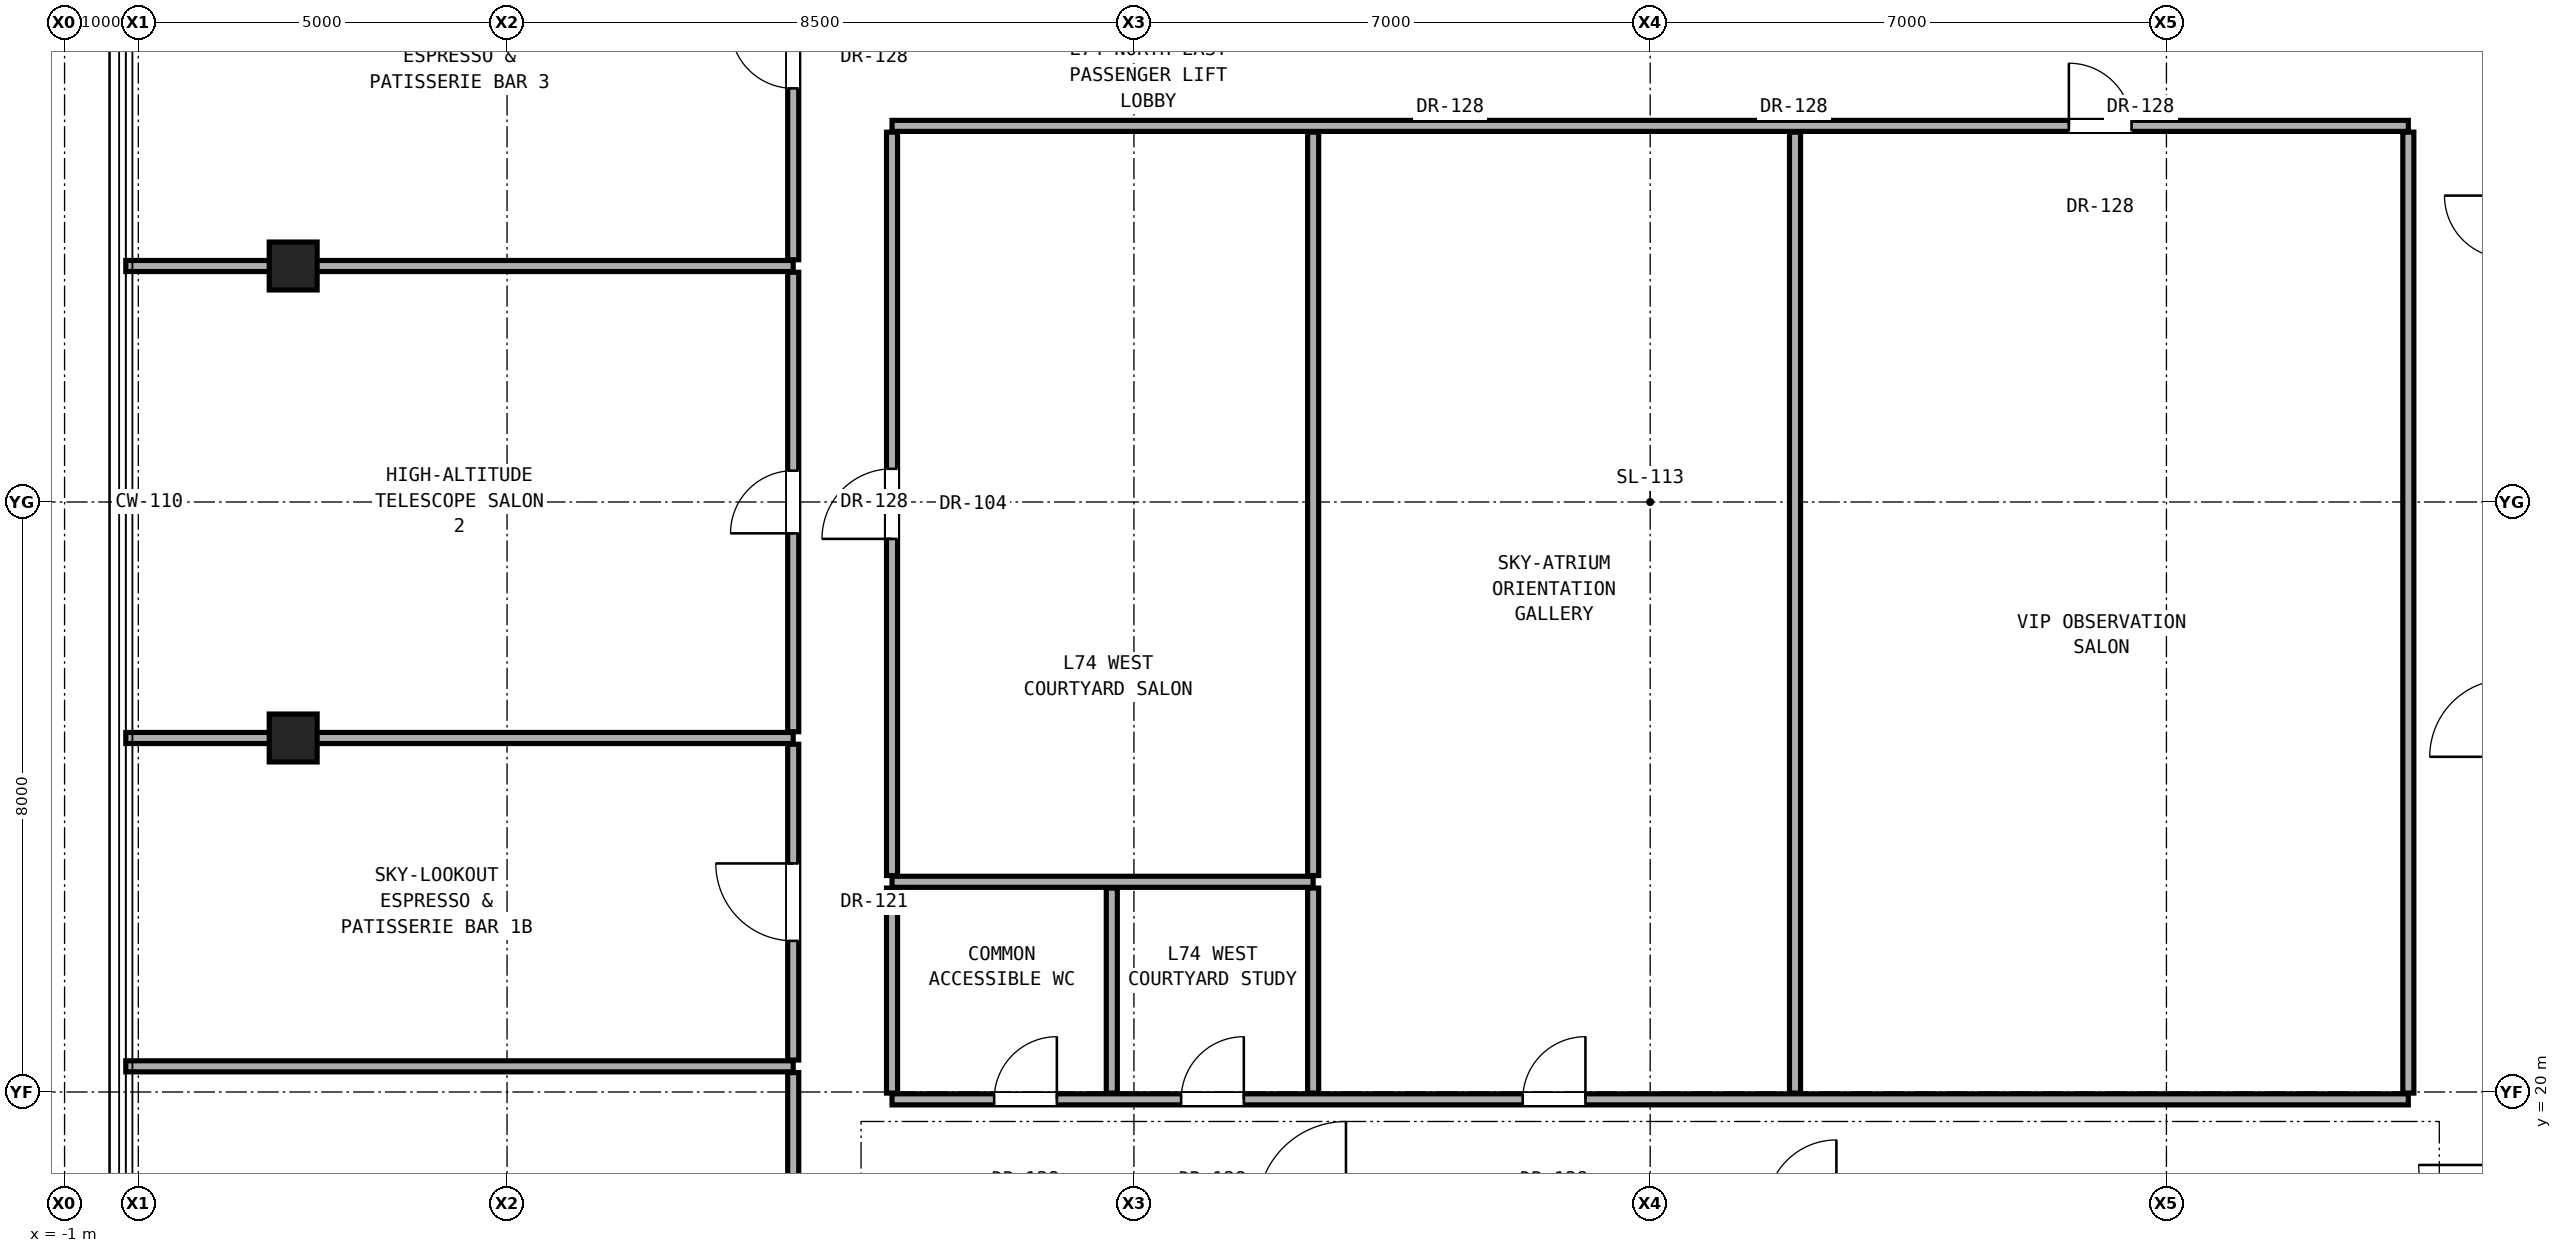
"""IFC4 building model, lengths in metres.
Left out: names, types, materials, properties, quantities, classifications, styles, units other than length and angle.
Written with IfcOpenShell. Run it as: python <this file> out.ifc"""

import sys

from ifc_helpers import new_model, si_unit, direction, frame, frame_2d, origin, origin_2d, place, context, subcontext, project, spatial, rectangle, hollow_rectangle, extrude, element, fill, save


model = new_model("IFC4")
c1 = context("Model", 3, precision=1e-05, world=origin(), true_north=direction((0.0, 1.0)))
c2 = subcontext(c1, "Body", "Model", "MODEL_VIEW")
j1 = project(units=[si_unit("LENGTHUNIT", "METRE"), si_unit("PLANEANGLEUNIT", "RADIAN")], contexts=[c1])
p1 = place(None, origin())
s1 = spatial("IfcSite", under=j1, at=p1, CompositionType="ELEMENT")
p2 = place(p1, origin())
s2 = spatial("IfcBuilding", under=s1, at=p2, CompositionType="ELEMENT")
p3 = place(p2, frame((0.0, 0.0, 259.9)))
s3 = spatial("IfcBuildingStorey", under=s2, at=p3, CompositionType="ELEMENT", Elevation=259.9)
for number, where, z_axis, x_axis in (
    (1, (2.1, 24.8, 0.0), (0.0, 0.0, 1.0), (1.0, 0.0, 0.0)),
    (2, (2.1, 31.2, 0.0), (0.0, 0.0, 1.0), (1.0, 0.0, 0.0)),
):
    element("IfcColumn", number, at=place(p3, frame(where, z_axis=z_axis, x_axis=x_axis)), inside=s3, PredefinedType="COLUMN", context=c2, shape_type="SweptSolid", body=[
        extrude(hollow_rectangle(XDim=0.65, YDim=0.65, WallThickness=0.036, at=origin_2d()), origin(), (0.0, 0.0, 1.0), 3.6),
    ])
p4 = place(p3, frame((10.22, 19.9, 0.0), z_axis=(0.0, 0.0, 1.0), x_axis=(1.0, 0.0, 0.0)))
e3 = element("IfcWall", 3, at=p4, inside=s3, PredefinedType="PARTITIONING", context=c2, shape_type="SweptSolid", body=[
    extrude(rectangle(XDim=20.56, YDim=0.15, at=frame_2d((10.28, 0.0))), origin(), (0.0, 0.0, 1.0), 2.086),
])
p5 = place(p4, frame((1.385, 0.0, 0.0)))
e4 = element("IfcOpeningElement", 4, at=p5, cuts=e3, PredefinedType="OPENING", context=c2, shape_type="SweptSolid", body=[
    extrude(rectangle(XDim=0.85, YDim=2.01, at=frame_2d((0.425, 1.005))), frame((0.0, 0.085, 0.0), z_axis=(0.0, -1.0, 0.0), x_axis=(1.0, 0.0, 0.0)), (0.0, 0.0, 1.0), 0.17),
])
p6 = place(p4, frame((3.92, 0.0, 0.0)))
e5 = element("IfcOpeningElement", 5, at=p6, cuts=e3, PredefinedType="OPENING", context=c2, shape_type="SweptSolid", body=[
    extrude(rectangle(XDim=0.85, YDim=2.01, at=frame_2d((0.425, 1.005))), frame((0.0, 0.085, 0.0), z_axis=(0.0, -1.0, 0.0), x_axis=(1.0, 0.0, 0.0)), (0.0, 0.0, 1.0), 0.17),
])
p7 = place(p4, frame((8.552, 0.0, 0.0)))
e6 = element("IfcOpeningElement", 6, at=p7, cuts=e3, PredefinedType="OPENING", context=c2, shape_type="SweptSolid", body=[
    extrude(rectangle(XDim=0.85, YDim=2.01, at=frame_2d((0.425, 1.005))), frame((0.0, 0.085, 0.0), z_axis=(0.0, -1.0, 0.0), x_axis=(1.0, 0.0, 0.0)), (0.0, 0.0, 1.0), 0.17),
])
p8 = place(p3, frame((-0.17, 20.348, 0.0), z_axis=(0.0, 0.0, 1.0), x_axis=(1.0, 0.0, 0.0)))
e7 = element("IfcWall", 7, at=p8, inside=s3, PredefinedType="PARTITIONING", context=c2, shape_type="SweptSolid", body=[
    extrude(rectangle(XDim=9.05, YDim=0.15, at=frame_2d((4.525, 0.0))), origin(), (0.0, 0.0, 1.0), 2.169),
])
p9 = place(p3, frame((10.22, 22.85, 0.0), z_axis=(0.0, 0.0, 1.0), x_axis=(1.0, 0.0, 0.0)))
e8 = element("IfcWall", 8, at=p9, inside=s3, PredefinedType="PARTITIONING", context=c2, shape_type="SweptSolid", body=[
    extrude(rectangle(XDim=5.71, YDim=0.15, at=frame_2d((2.855, 0.0))), origin(), (0.0, 0.0, 1.0), 2.086),
])
for number, where, z_axis, x_axis in (
    (9, (-0.17, 24.8, 0.0), (0.0, 0.0, 1.0), (1.0, 0.0, 0.0)),
    (10, (-0.17, 31.2, 0.0), (0.0, 0.0, 1.0), (1.0, 0.0, 0.0)),
):
    element("IfcWall", number, at=place(p3, frame(where, z_axis=z_axis, x_axis=x_axis)), inside=s3, PredefinedType="PARTITIONING", context=c2, shape_type="SweptSolid", body=[
        extrude(rectangle(XDim=9.05, YDim=0.15, at=frame_2d((4.525, 0.0))), origin(), (0.0, 0.0, 1.0), 2.169),
    ])
p10 = place(p3, frame((10.22, 33.1, 0.0), z_axis=(0.0, 0.0, 1.0), x_axis=(1.0, 0.0, 0.0)))
e11 = element("IfcWall", 11, at=p10, inside=s3, PredefinedType="PARTITIONING", context=c2, shape_type="SweptSolid", body=[
    extrude(rectangle(XDim=20.56, YDim=0.15, at=frame_2d((10.28, 0.0))), origin(), (0.0, 0.0, 1.0), 2.086),
])
p11 = place(p10, frame((15.957, 0.0, 0.0)))
e12 = element("IfcOpeningElement", 12, at=p11, cuts=e11, PredefinedType="OPENING", context=c2, shape_type="SweptSolid", body=[
    extrude(rectangle(XDim=0.85, YDim=2.01, at=frame_2d((0.425, 1.005))), frame((0.0, 0.085, 0.0), z_axis=(0.0, -1.0, 0.0), x_axis=(1.0, 0.0, 0.0)), (0.0, 0.0, 1.0), 0.17),
])
p12 = place(p3, frame((8.88, 14.766, 0.0), z_axis=(0.0, 0.0, 1.0), x_axis=(0.0, 1.0, 0.0)))
e13 = element("IfcWall", 13, at=p12, inside=s3, PredefinedType="PARTITIONING", context=c2, shape_type="SweptSolid", body=[
    extrude(rectangle(XDim=5.497, YDim=0.15, at=frame_2d((2.749, 0.0))), origin(), (0.0, 0.0, 1.0), 2.393),
])
p13 = place(p12, frame((2.148, 0.0, 0.0)))
e14 = element("IfcOpeningElement", 14, at=p13, cuts=e13, PredefinedType="OPENING", context=c2, shape_type="SweptSolid", body=[
    extrude(rectangle(XDim=1.2, YDim=2.25, at=frame_2d((0.6, 1.125))), frame((0.0, 0.085, 0.0), z_axis=(0.0, -1.0, 0.0), x_axis=(1.0, 0.0, 0.0)), (0.0, 0.0, 1.0), 0.17),
])
p14 = place(p3, frame((8.88, 20.433, 0.0), z_axis=(0.0, 0.0, 1.0), x_axis=(0.0, 1.0, 0.0)))
e15 = element("IfcWall", 15, at=p14, inside=s3, PredefinedType="PARTITIONING", context=c2, shape_type="SweptSolid", body=[
    extrude(rectangle(XDim=4.282, YDim=0.15, at=frame_2d((2.141, 0.0))), origin(), (0.0, 0.0, 1.0), 2.246),
])
p15 = place(p14, frame((1.616, 0.0, 0.0)))
e16 = element("IfcOpeningElement", 16, at=p15, cuts=e15, PredefinedType="OPENING", context=c2, shape_type="SweptSolid", body=[
    extrude(rectangle(XDim=1.05, YDim=2.2, at=frame_2d((0.525, 1.1))), frame((0.0, 0.085, 0.0), z_axis=(0.0, -1.0, 0.0), x_axis=(1.0, 0.0, 0.0)), (0.0, 0.0, 1.0), 0.17),
])
p16 = place(p3, frame((8.88, 24.885, 0.0), z_axis=(0.0, 0.0, 1.0), x_axis=(0.0, 1.0, 0.0)))
e17 = element("IfcWall", 17, at=p16, inside=s3, PredefinedType="PARTITIONING", context=c2, shape_type="SweptSolid", body=[
    extrude(rectangle(XDim=6.23, YDim=0.15, at=frame_2d((3.115, 0.0))), origin(), (0.0, 0.0, 1.0), 2.246),
])
p17 = place(p16, frame((2.69, 0.0, 0.0)))
e18 = element("IfcOpeningElement", 18, at=p17, cuts=e17, PredefinedType="OPENING", context=c2, shape_type="SweptSolid", body=[
    extrude(rectangle(XDim=0.85, YDim=2.01, at=frame_2d((0.425, 1.005))), frame((0.0, 0.085, 0.0), z_axis=(0.0, -1.0, 0.0), x_axis=(1.0, 0.0, 0.0)), (0.0, 0.0, 1.0), 0.17),
])
p18 = place(p3, frame((8.88, 31.285, 0.0), z_axis=(0.0, 0.0, 1.0), x_axis=(0.0, 1.0, 0.0)))
e19 = element("IfcWall", 19, at=p18, inside=s3, PredefinedType="PARTITIONING", context=c2, shape_type="SweptSolid", body=[
    extrude(rectangle(XDim=5.497, YDim=0.15, at=frame_2d((2.749, 0.0))), origin(), (0.0, 0.0, 1.0), 2.246),
])
p19 = place(p18, frame((2.323, 0.0, 0.0)))
e20 = element("IfcOpeningElement", 20, at=p19, cuts=e19, PredefinedType="OPENING", context=c2, shape_type="SweptSolid", body=[
    extrude(rectangle(XDim=0.85, YDim=2.01, at=frame_2d((0.425, 1.005))), frame((0.0, 0.085, 0.0), z_axis=(0.0, -1.0, 0.0), x_axis=(1.0, 0.0, 0.0)), (0.0, 0.0, 1.0), 0.17),
])
p20 = place(p3, frame((10.22, 19.985, 0.0), z_axis=(0.0, 0.0, 1.0), x_axis=(0.0, 1.0, 0.0)))
e21 = element("IfcWall", 21, at=p20, inside=s3, PredefinedType="PARTITIONING", context=c2, shape_type="SweptSolid", body=[
    extrude(rectangle(XDim=2.78, YDim=0.15, at=frame_2d((1.39, 0.0))), origin(), (0.0, 0.0, 1.0), 2.95),
])
p21 = place(p3, frame((10.22, 22.935, 0.0), z_axis=(0.0, 0.0, 1.0), x_axis=(0.0, 1.0, 0.0)))
e22 = element("IfcWall", 22, at=p21, inside=s3, PredefinedType="PARTITIONING", context=c2, shape_type="SweptSolid", body=[
    extrude(rectangle(XDim=10.08, YDim=0.15, at=frame_2d((5.04, 0.0))), origin(), (0.0, 0.0, 1.0), 2.246),
])
p22 = place(p21, frame((4.565, 0.0, 0.0)))
e23 = element("IfcOpeningElement", 23, at=p22, cuts=e22, PredefinedType="OPENING", context=c2, shape_type="SweptSolid", body=[
    extrude(rectangle(XDim=0.95, YDim=2.15, at=frame_2d((0.475, 1.075))), frame((0.0, 0.085, 0.0), z_axis=(0.0, -1.0, 0.0), x_axis=(1.0, 0.0, 0.0)), (0.0, 0.0, 1.0), 0.17),
])
for number, where, z_axis, x_axis in (
    (24, (13.2, 19.985, 0.0), (0.0, 0.0, 1.0), (0.0, 1.0, 0.0)),
    (25, (15.93, 19.985, 0.0), (0.0, 0.0, 1.0), (0.0, 1.0, 0.0)),
):
    element("IfcWall", number, at=place(p3, frame(where, z_axis=z_axis, x_axis=x_axis)), inside=s3, PredefinedType="PARTITIONING", context=c2, shape_type="SweptSolid", body=[
        extrude(rectangle(XDim=2.78, YDim=0.15, at=frame_2d((1.39, 0.0))), origin(), (0.0, 0.0, 1.0), 2.95),
    ])
p23 = place(p3, frame((15.93, 22.935, 0.0), z_axis=(0.0, 0.0, 1.0), x_axis=(0.0, 1.0, 0.0)))
e26 = element("IfcWall", 26, at=p23, inside=s3, PredefinedType="PARTITIONING", context=c2, shape_type="SweptSolid", body=[
    extrude(rectangle(XDim=10.08, YDim=0.15, at=frame_2d((5.04, 0.0))), origin(), (0.0, 0.0, 1.0), 2.086),
])
p24 = place(p3, frame((22.464, 19.985, 0.0), z_axis=(0.0, 0.0, 1.0), x_axis=(0.0, 1.0, 0.0)))
e27 = element("IfcWall", 27, at=p24, inside=s3, PredefinedType="PARTITIONING", context=c2, shape_type="SweptSolid", body=[
    extrude(rectangle(XDim=13.03, YDim=0.15, at=frame_2d((6.515, 0.0))), origin(), (0.0, 0.0, 1.0), 2.086),
])
p25 = place(p3, frame((30.78, 19.985, 0.0), z_axis=(0.0, 0.0, 1.0), x_axis=(0.0, 1.0, 0.0)))
e28 = element("IfcWall", 28, at=p25, inside=s3, PredefinedType="PARTITIONING", context=c2, shape_type="SweptSolid", body=[
    extrude(rectangle(XDim=13.03, YDim=0.15, at=frame_2d((6.515, 0.0))), origin(), (0.0, 0.0, 1.0), 2.246),
])
p26 = place(p5, origin())
e29 = element("IfcDoor", 29, at=p26, inside=s3, OperationType="SINGLE_SWING_RIGHT", PredefinedType="DOOR", context=c2, shape_type="SweptSolid", body=[
    extrude(rectangle(XDim=0.85, YDim=2.01, at=frame_2d((0.425, 1.005))), frame((0.0, 0.025, 0.0), z_axis=(0.0, -1.0, 0.0), x_axis=(1.0, 0.0, 0.0)), (0.0, 0.0, 1.0), 0.05),
])
fill(e4, e29)
p27 = place(p15, origin())
e30 = element("IfcDoor", 30, at=p27, inside=s3, OperationType="SINGLE_SWING_RIGHT", PredefinedType="DOOR", context=c2, shape_type="SweptSolid", body=[
    extrude(rectangle(XDim=1.05, YDim=2.2, at=frame_2d((0.525, 1.1))), frame((0.0, 0.025, 0.0), z_axis=(0.0, -1.0, 0.0), x_axis=(1.0, 0.0, 0.0)), (0.0, 0.0, 1.0), 0.05),
])
fill(e16, e30)
p28 = place(p17, origin())
e31 = element("IfcDoor", 31, at=p28, inside=s3, OperationType="SINGLE_SWING_LEFT", PredefinedType="DOOR", context=c2, shape_type="SweptSolid", body=[
    extrude(rectangle(XDim=0.85, YDim=2.01, at=frame_2d((0.425, 1.005))), frame((0.0, 0.025, 0.0), z_axis=(0.0, -1.0, 0.0), x_axis=(1.0, 0.0, 0.0)), (0.0, 0.0, 1.0), 0.05),
])
fill(e18, e31)
p29 = place(p19, origin())
e32 = element("IfcDoor", 32, at=p29, inside=s3, OperationType="SINGLE_SWING_RIGHT", PredefinedType="DOOR", context=c2, shape_type="SweptSolid", body=[
    extrude(rectangle(XDim=0.85, YDim=2.01, at=frame_2d((0.425, 1.005))), frame((0.0, 0.025, 0.0), z_axis=(0.0, -1.0, 0.0), x_axis=(1.0, 0.0, 0.0)), (0.0, 0.0, 1.0), 0.05),
])
fill(e20, e32)
p30 = place(p6, origin())
e33 = element("IfcDoor", 33, at=p30, inside=s3, OperationType="SINGLE_SWING_RIGHT", PredefinedType="DOOR", context=c2, shape_type="SweptSolid", body=[
    extrude(rectangle(XDim=0.85, YDim=2.01, at=frame_2d((0.425, 1.005))), frame((0.0, 0.025, 0.0), z_axis=(0.0, -1.0, 0.0), x_axis=(1.0, 0.0, 0.0)), (0.0, 0.0, 1.0), 0.05),
])
fill(e5, e33)
p31 = place(p22, origin())
e34 = element("IfcDoor", 34, at=p31, inside=s3, OperationType="SINGLE_SWING_LEFT", PredefinedType="DOOR", context=c2, shape_type="SweptSolid", body=[
    extrude(rectangle(XDim=0.95, YDim=2.15, at=frame_2d((0.475, 1.075))), frame((0.0, 0.025, 0.0), z_axis=(0.0, -1.0, 0.0), x_axis=(1.0, 0.0, 0.0)), (0.0, 0.0, 1.0), 0.05),
])
fill(e23, e34)
p32 = place(p7, origin())
e35 = element("IfcDoor", 35, at=p32, inside=s3, OperationType="SINGLE_SWING_RIGHT", PredefinedType="DOOR", context=c2, shape_type="SweptSolid", body=[
    extrude(rectangle(XDim=0.85, YDim=2.01, at=frame_2d((0.425, 1.005))), frame((0.0, 0.025, 0.0), z_axis=(0.0, -1.0, 0.0), x_axis=(1.0, 0.0, 0.0)), (0.0, 0.0, 1.0), 0.05),
])
fill(e6, e35)
p33 = place(p11, origin())
e36 = element("IfcDoor", 36, at=p33, inside=s3, OperationType="SINGLE_SWING_LEFT", PredefinedType="DOOR", context=c2, shape_type="SweptSolid", body=[
    extrude(rectangle(XDim=0.85, YDim=2.01, at=frame_2d((0.425, 1.005))), frame((0.0, 0.025, 0.0), z_axis=(0.0, -1.0, 0.0), x_axis=(1.0, 0.0, 0.0)), (0.0, 0.0, 1.0), 0.05),
])
fill(e12, e36)
save(model, sys.argv[1])
